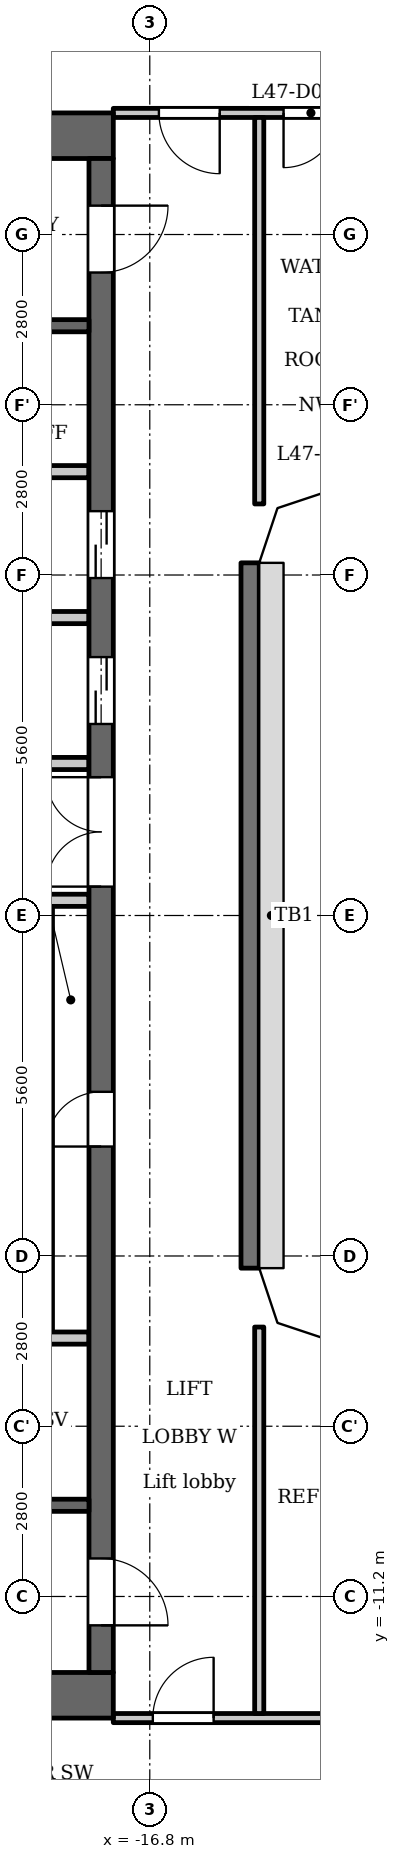
"""IFC4 building model, lengths in metres.
Left out: names, types, materials, properties, quantities, classifications, styles, units other than length and angle.
Written with IfcOpenShell. Run it as: python <this file> out.ifc"""

import sys

from ifc_helpers import new_model, si_unit, direction, frame, frame_2d, origin, place, context, subcontext, project, spatial, polyline, rectangle, outline, extrude, element, fill, save


model = new_model("IFC4")
c1 = context("Model", 3, precision=1e-05, world=origin(), true_north=direction((0.0, 1.0)))
c2 = subcontext(c1, "Body", "Model", "MODEL_VIEW")
j1 = project(units=[si_unit("LENGTHUNIT", "METRE"), si_unit("PLANEANGLEUNIT", "RADIAN")], contexts=[c1])
p1 = place(None, origin())
s1 = spatial("IfcSite", under=j1, at=p1, CompositionType="ELEMENT")
p2 = place(p1, origin())
s2 = spatial("IfcBuilding", under=s1, at=p2, CompositionType="ELEMENT")
p3 = place(p2, frame((0.0, 0.0, 183.5)))
s3 = spatial("IfcBuildingStorey", under=s2, at=p3, CompositionType="ELEMENT", Elevation=183.5)
p4 = place(p3, frame((-15.15, -5.8, 0.0), z_axis=(0.0, 0.0, 1.0), x_axis=(0.0, 1.0, 0.0)))
e1 = element("IfcWall", 1, at=p4, inside=s3, PredefinedType="SOLIDWALL", context=c2, shape_type="SweptSolid", body=[
    extrude(rectangle(XDim=11.6, YDim=0.3, at=frame_2d((5.8, 0.0))), origin(), (0.0, 0.0, 1.0), 4.6),
])
for number, where, z_axis, x_axis in (
    (2, (-17.4, 12.825, 0.0), (0.0, 0.0, 1.0), (-1.0, 0.0, 0.0)),
    (3, (-17.4, -12.825, 0.0), (0.0, 0.0, 1.0), (-1.0, 0.0, 0.0)),
):
    element("IfcWall", number, at=place(p3, frame(where, z_axis=z_axis, x_axis=x_axis)), inside=s3, PredefinedType="SHEAR", context=c2, shape_type="SweptSolid", body=[
        extrude(rectangle(XDim=10.4, YDim=0.75, at=frame_2d((5.2, 0.0))), origin(), (0.0, 0.0, 1.0), 4.6),
    ])
p5 = place(p3, frame((-17.6, -12.45, 0.0), z_axis=(0.0, 0.0, 1.0), x_axis=(0.0, 1.0, 0.0)))
e4 = element("IfcWall", 4, at=p5, inside=s3, PredefinedType="SHEAR", context=c2, shape_type="SweptSolid", body=[
    extrude(rectangle(XDim=24.9, YDim=0.4, at=frame_2d((12.45, 0.0))), origin(), (0.0, 0.0, 1.0), 4.6),
])
p6 = place(p5, frame((8.65, 0.0, 0.0)))
e5 = element("IfcOpeningElement", 5, at=p6, cuts=e4, PredefinedType="OPENING", context=c2, shape_type="SweptSolid", body=[
    extrude(rectangle(XDim=0.9, YDim=2.1, at=frame_2d((0.45, 1.05))), frame((0.0, 0.21, 0.0), z_axis=(0.0, -1.0, 0.0), x_axis=(1.0, 0.0, 0.0)), (0.0, 0.0, 1.0), 0.42),
])
p7 = place(p5, frame((15.6, 0.0, 0.0)))
e6 = element("IfcOpeningElement", 6, at=p7, cuts=e4, PredefinedType="OPENING", context=c2, shape_type="SweptSolid", body=[
    extrude(rectangle(XDim=1.1, YDim=2.1, at=frame_2d((0.55, 1.05))), frame((0.0, 0.21, 0.0), z_axis=(0.0, -1.0, 0.0), x_axis=(1.0, 0.0, 0.0)), (0.0, 0.0, 1.0), 0.42),
])
p8 = place(p5, frame((18.0, 0.0, 0.0)))
e7 = element("IfcOpeningElement", 7, at=p8, cuts=e4, PredefinedType="OPENING", context=c2, shape_type="SweptSolid", body=[
    extrude(rectangle(XDim=1.1, YDim=2.1, at=frame_2d((0.55, 1.05))), frame((0.0, 0.21, 0.0), z_axis=(0.0, -1.0, 0.0), x_axis=(1.0, 0.0, 0.0)), (0.0, 0.0, 1.0), 0.42),
])
p9 = place(p5, frame((23.025, 0.0, 0.0)))
e8 = element("IfcOpeningElement", 8, at=p9, cuts=e4, PredefinedType="OPENING", context=c2, shape_type="SweptSolid", body=[
    extrude(rectangle(XDim=1.1, YDim=2.1, at=frame_2d((0.55, 1.05))), frame((0.0, 0.21, 0.0), z_axis=(0.0, -1.0, 0.0), x_axis=(1.0, 0.0, 0.0)), (0.0, 0.0, 1.0), 0.42),
])
p10 = place(p5, frame((0.775, 0.0, 0.0)))
e9 = element("IfcOpeningElement", 9, at=p10, cuts=e4, PredefinedType="OPENING", context=c2, shape_type="SweptSolid", body=[
    extrude(rectangle(XDim=1.1, YDim=2.1, at=frame_2d((0.55, 1.05))), frame((0.0, 0.21, 0.0), z_axis=(0.0, -1.0, 0.0), x_axis=(1.0, 0.0, 0.0)), (0.0, 0.0, 1.0), 0.42),
])
p11 = place(p5, frame((12.925, 0.0, 0.0)))
e10 = element("IfcOpeningElement", 10, at=p11, cuts=e4, PredefinedType="OPENING", context=c2, shape_type="SweptSolid", body=[
    extrude(rectangle(XDim=1.8, YDim=2.1, at=frame_2d((0.9, 1.05))), frame((0.0, 0.21, 0.0), z_axis=(0.0, -1.0, 0.0), x_axis=(1.0, 0.0, 0.0)), (0.0, 0.0, 1.0), 0.42),
])
p12 = place(p3, frame((-17.8, -9.7, 0.0), z_axis=(0.0, 0.0, 1.0), x_axis=(-1.0, 0.0, 0.0)))
e11 = element("IfcWall", 11, at=p12, inside=s3, PredefinedType="SHEAR", context=c2, shape_type="SweptSolid", body=[
    extrude(rectangle(XDim=8.45, YDim=0.2, at=frame_2d((4.225, 0.0))), origin(), (0.0, 0.0, 1.0), 4.6),
])
p13 = place(p12, frame((0.85, 0.0, 0.0)))
e12 = element("IfcOpeningElement", 12, at=p13, cuts=e11, PredefinedType="OPENING", context=c2, shape_type="SweptSolid", body=[
    extrude(rectangle(XDim=1.1, YDim=2.1, at=frame_2d((0.55, 1.05))), frame((0.0, 0.11, 0.0), z_axis=(0.0, -1.0, 0.0), x_axis=(1.0, 0.0, 0.0)), (0.0, 0.0, 1.0), 0.22),
])
p14 = place(p12, frame((3.75, 0.0, 0.0)))
e13 = element("IfcOpeningElement", 13, at=p14, cuts=e11, PredefinedType="OPENING", context=c2, shape_type="SweptSolid", body=[
    extrude(rectangle(XDim=1.1, YDim=2.1, at=frame_2d((0.55, 1.05))), frame((0.0, 0.11, 0.0), z_axis=(0.0, -1.0, 0.0), x_axis=(1.0, 0.0, 0.0)), (0.0, 0.0, 1.0), 0.22),
])
p15 = place(p3, frame((-17.8, -6.95, 0.0), z_axis=(0.0, 0.0, 1.0), x_axis=(-1.0, 0.0, 0.0)))
e14 = element("IfcWall", 14, at=p15, inside=s3, PredefinedType="PARTITIONING", context=c2, shape_type="SweptSolid", body=[
    extrude(rectangle(XDim=2.8, YDim=0.2, at=frame_2d((1.4, 0.0))), origin(), (0.0, 0.0, 1.0), 4.6),
])
p16 = place(p3, frame((-17.8, 0.25, 0.0), z_axis=(0.0, 0.0, 1.0), x_axis=(-1.0, 0.0, 0.0)))
e15 = element("IfcWall", 15, at=p16, inside=s3, PredefinedType="PARTITIONING", context=c2, shape_type="SweptSolid", body=[
    extrude(rectangle(XDim=3.0, YDim=0.2, at=frame_2d((1.5, 0.0))), origin(), (0.0, 0.0, 1.0), 4.6),
])
p17 = place(p16, frame((1.35, 0.0, 0.0)))
e16 = element("IfcOpeningElement", 16, at=p17, cuts=e15, PredefinedType="OPENING", context=c2, shape_type="SweptSolid", body=[
    extrude(rectangle(XDim=0.9, YDim=2.1, at=frame_2d((0.45, 1.05))), frame((0.0, 0.11, 0.0), z_axis=(0.0, -1.0, 0.0), x_axis=(1.0, 0.0, 0.0)), (0.0, 0.0, 1.0), 0.22),
])
p18 = place(p3, frame((-17.8, 2.5, 0.0), z_axis=(0.0, 0.0, 1.0), x_axis=(-1.0, 0.0, 0.0)))
e17 = element("IfcWall", 17, at=p18, inside=s3, PredefinedType="PARTITIONING", context=c2, shape_type="SweptSolid", body=[
    extrude(rectangle(XDim=3.0, YDim=0.2, at=frame_2d((1.5, 0.0))), origin(), (0.0, 0.0, 1.0), 4.6),
])
for number, where, z_axis, x_axis in (
    (18, (-17.8, 4.9, 0.0), (0.0, 0.0, 1.0), (-1.0, 0.0, 0.0)),
    (19, (-17.8, 7.3, 0.0), (0.0, 0.0, 1.0), (-1.0, 0.0, 0.0)),
):
    element("IfcWall", number, at=place(p3, frame(where, z_axis=z_axis, x_axis=x_axis)), inside=s3, PredefinedType="PARTITIONING", context=c2, shape_type="SweptSolid", body=[
        extrude(rectangle(XDim=2.8, YDim=0.2, at=frame_2d((1.4, 0.0))), origin(), (0.0, 0.0, 1.0), 4.6),
    ])
p19 = place(p3, frame((-17.8, 9.7, 0.0), z_axis=(0.0, 0.0, 1.0), x_axis=(-1.0, 0.0, 0.0)))
e20 = element("IfcWall", 20, at=p19, inside=s3, PredefinedType="SHEAR", context=c2, shape_type="SweptSolid", body=[
    extrude(rectangle(XDim=8.45, YDim=0.2, at=frame_2d((4.225, 0.0))), origin(), (0.0, 0.0, 1.0), 4.6),
])
p20 = place(p19, frame((0.85, 0.0, 0.0)))
e21 = element("IfcOpeningElement", 21, at=p20, cuts=e20, PredefinedType="OPENING", context=c2, shape_type="SweptSolid", body=[
    extrude(rectangle(XDim=1.1, YDim=2.1, at=frame_2d((0.55, 1.05))), frame((0.0, 0.11, 0.0), z_axis=(0.0, -1.0, 0.0), x_axis=(1.0, 0.0, 0.0)), (0.0, 0.0, 1.0), 0.22),
])
p21 = place(p19, frame((3.75, 0.0, 0.0)))
e22 = element("IfcOpeningElement", 22, at=p21, cuts=e20, PredefinedType="OPENING", context=c2, shape_type="SweptSolid", body=[
    extrude(rectangle(XDim=1.1, YDim=2.1, at=frame_2d((0.55, 1.05))), frame((0.0, 0.11, 0.0), z_axis=(0.0, -1.0, 0.0), x_axis=(1.0, 0.0, 0.0)), (0.0, 0.0, 1.0), 0.22),
])
p22 = place(p3, frame((-17.4, -13.2, 0.0), z_axis=(0.0, 0.0, 1.0), x_axis=(1.0, 0.0, 0.0)))
e23 = element("IfcWall", 23, at=p22, inside=s3, PredefinedType="PARTITIONING", context=c2, shape_type="SweptSolid", body=[
    extrude(rectangle(XDim=5.88, YDim=0.15, at=frame_2d((2.94, 0.0))), origin(), (0.0, 0.0, 1.0), 4.6),
])
p23 = place(p22, frame((0.65, 0.0, 0.0)))
e24 = element("IfcOpeningElement", 24, at=p23, cuts=e23, PredefinedType="OPENING", context=c2, shape_type="SweptSolid", body=[
    extrude(rectangle(XDim=1.0, YDim=2.1, at=frame_2d((0.5, 1.05))), frame((0.0, 0.085, 0.0), z_axis=(0.0, -1.0, 0.0), x_axis=(1.0, 0.0, 0.0)), (0.0, 0.0, 1.0), 0.17),
])
p24 = place(p22, frame((4.26, 0.0, 0.0)))
e25 = element("IfcOpeningElement", 25, at=p24, cuts=e23, PredefinedType="OPENING", context=c2, shape_type="SweptSolid", body=[
    extrude(rectangle(XDim=1.2, YDim=2.1, at=frame_2d((0.6, 1.05))), frame((0.0, 0.085, 0.0), z_axis=(0.0, -1.0, 0.0), x_axis=(1.0, 0.0, 0.0)), (0.0, 0.0, 1.0), 0.17),
])
p25 = place(p3, frame((-17.4, 13.2, 0.0), z_axis=(0.0, 0.0, 1.0), x_axis=(1.0, 0.0, 0.0)))
e26 = element("IfcWall", 26, at=p25, inside=s3, PredefinedType="PARTITIONING", context=c2, shape_type="SweptSolid", body=[
    extrude(rectangle(XDim=5.88, YDim=0.15, at=frame_2d((2.94, 0.0))), origin(), (0.0, 0.0, 1.0), 4.6),
])
p26 = place(p25, frame((0.75, 0.0, 0.0)))
e27 = element("IfcOpeningElement", 27, at=p26, cuts=e26, PredefinedType="OPENING", context=c2, shape_type="SweptSolid", body=[
    extrude(rectangle(XDim=1.0, YDim=2.1, at=frame_2d((0.5, 1.05))), frame((0.0, 0.085, 0.0), z_axis=(0.0, -1.0, 0.0), x_axis=(1.0, 0.0, 0.0)), (0.0, 0.0, 1.0), 0.17),
])
p27 = place(p25, frame((4.7, 0.0, 0.0)))
e28 = element("IfcOpeningElement", 28, at=p27, cuts=e26, PredefinedType="OPENING", context=c2, shape_type="SweptSolid", body=[
    extrude(rectangle(XDim=0.9, YDim=2.1, at=frame_2d((0.45, 1.05))), frame((0.0, 0.085, 0.0), z_axis=(0.0, -1.0, 0.0), x_axis=(1.0, 0.0, 0.0)), (0.0, 0.0, 1.0), 0.17),
])
p28 = place(p25, frame((2.8, 0.0, 0.0)))
e29 = element("IfcOpeningElement", 29, at=p28, cuts=e26, PredefinedType="OPENING", context=c2, shape_type="SweptSolid", body=[
    extrude(rectangle(XDim=0.9, YDim=2.1, at=frame_2d((0.45, 1.05))), frame((0.0, 0.085, 0.0), z_axis=(0.0, -1.0, 0.0), x_axis=(1.0, 0.0, 0.0)), (0.0, 0.0, 1.0), 0.17),
])
for number, where, z_axis, x_axis in (
    (30, (-15.0, -13.125, 0.0), (0.0, 0.0, 1.0), (0.0, 1.0, 0.0)),
    (31, (-15.0, 6.769, 0.0), (0.0, 0.0, 1.0), (0.0, 1.0, 0.0)),
):
    element("IfcWall", number, at=place(p3, frame(where, z_axis=z_axis, x_axis=x_axis)), inside=s3, PredefinedType="PARTITIONING", context=c2, shape_type="SweptSolid", body=[
        extrude(rectangle(XDim=6.356, YDim=0.15, at=frame_2d((3.178, 0.0))), origin(), (0.0, 0.0, 1.0), 4.6),
    ])
p29 = place(p3, origin())
e32 = element("IfcWall", 32, at=p29, inside=s3, PredefinedType="SOLIDWALL", context=c2, shape_type="SweptSolid", body=[
    extrude(outline(polyline([(-15.0, 5.8), (-14.7, 6.7), (-13.8, 7.0), (-13.8, 7.3), (-13.849, 7.3), (-14.937, 6.937), (-15.3, 5.849), (-15.3, 5.8), (-15.0, 5.8)])), origin(), (0.0, 0.0, 1.0), 4.6),
])
e33 = element("IfcWall", 33, at=p29, inside=s3, PredefinedType="SOLIDWALL", context=c2, shape_type="SweptSolid", body=[
    extrude(outline(polyline([(-13.8, -7.0), (-14.7, -6.7), (-15.0, -5.8), (-15.3, -5.8), (-15.3, -5.849), (-14.937, -6.937), (-13.849, -7.3), (-13.8, -7.3), (-13.8, -7.0)])), origin(), (0.0, 0.0, 1.0), 4.6),
])
p30 = place(p6, origin())
e34 = element("IfcDoor", 34, at=p30, inside=s3, OperationType="SINGLE_SWING_RIGHT", PredefinedType="DOOR", context=c2, shape_type="SweptSolid", body=[
    extrude(rectangle(XDim=0.9, YDim=2.1, at=frame_2d((0.45, 1.05))), frame((0.0, 0.025, 0.0), z_axis=(0.0, -1.0, 0.0), x_axis=(1.0, 0.0, 0.0)), (0.0, 0.0, 1.0), 0.05),
])
fill(e5, e34)
p31 = place(p7, origin())
e35 = element("IfcDoor", 35, at=p31, inside=s3, OperationType="DOUBLE_DOOR_SLIDING", PredefinedType="DOOR", context=c2, shape_type="SweptSolid", body=[
    extrude(rectangle(XDim=1.1, YDim=2.1, at=frame_2d((0.55, 1.05))), frame((0.0, 0.025, 0.0), z_axis=(0.0, -1.0, 0.0), x_axis=(1.0, 0.0, 0.0)), (0.0, 0.0, 1.0), 0.05),
])
fill(e6, e35)
p32 = place(p8, origin())
e36 = element("IfcDoor", 36, at=p32, inside=s3, OperationType="DOUBLE_DOOR_SLIDING", PredefinedType="DOOR", context=c2, shape_type="SweptSolid", body=[
    extrude(rectangle(XDim=1.1, YDim=2.1, at=frame_2d((0.55, 1.05))), frame((0.0, 0.025, 0.0), z_axis=(0.0, -1.0, 0.0), x_axis=(1.0, 0.0, 0.0)), (0.0, 0.0, 1.0), 0.05),
])
fill(e7, e36)
p33 = place(p9, origin())
e37 = element("IfcDoor", 37, at=p33, inside=s3, OperationType="SINGLE_SWING_RIGHT", PredefinedType="DOOR", context=c2, shape_type="SweptSolid", body=[
    extrude(rectangle(XDim=1.1, YDim=2.1, at=frame_2d((0.55, 1.05))), frame((0.0, 0.025, 0.0), z_axis=(0.0, -1.0, 0.0), x_axis=(1.0, 0.0, 0.0)), (0.0, 0.0, 1.0), 0.05),
])
fill(e8, e37)
p34 = place(p10, origin())
e38 = element("IfcDoor", 38, at=p34, inside=s3, OperationType="SINGLE_SWING_LEFT", PredefinedType="DOOR", context=c2, shape_type="SweptSolid", body=[
    extrude(rectangle(XDim=1.1, YDim=2.1, at=frame_2d((0.55, 1.05))), frame((0.0, 0.025, 0.0), z_axis=(0.0, -1.0, 0.0), x_axis=(1.0, 0.0, 0.0)), (0.0, 0.0, 1.0), 0.05),
])
fill(e9, e38)
p35 = place(p11, origin())
e39 = element("IfcDoor", 39, at=p35, inside=s3, OperationType="DOUBLE_DOOR_SINGLE_SWING", PredefinedType="DOOR", context=c2, shape_type="SweptSolid", body=[
    extrude(rectangle(XDim=1.8, YDim=2.1, at=frame_2d((0.9, 1.05))), frame((0.0, 0.025, 0.0), z_axis=(0.0, -1.0, 0.0), x_axis=(1.0, 0.0, 0.0)), (0.0, 0.0, 1.0), 0.05),
])
fill(e10, e39)
p36 = place(p26, origin())
e40 = element("IfcDoor", 40, at=p36, inside=s3, OperationType="SINGLE_SWING_RIGHT", PredefinedType="DOOR", context=c2, shape_type="SweptSolid", body=[
    extrude(rectangle(XDim=1.0, YDim=2.1, at=frame_2d((0.5, 1.05))), frame((0.0, 0.025, 0.0), z_axis=(0.0, -1.0, 0.0), x_axis=(1.0, 0.0, 0.0)), (0.0, 0.0, 1.0), 0.05),
])
fill(e27, e40)
p37 = place(p28, origin())
e41 = element("IfcDoor", 41, at=p37, inside=s3, OperationType="SINGLE_SWING_LEFT", PredefinedType="DOOR", context=c2, shape_type="SweptSolid", body=[
    extrude(rectangle(XDim=0.9, YDim=2.1, at=frame_2d((0.45, 1.05))), frame((0.0, 0.025, 0.0), z_axis=(0.0, -1.0, 0.0), x_axis=(1.0, 0.0, 0.0)), (0.0, 0.0, 1.0), 0.05),
])
fill(e29, e41)
p38 = place(p23, origin())
e42 = element("IfcDoor", 42, at=p38, inside=s3, OperationType="SINGLE_SWING_LEFT", PredefinedType="DOOR", context=c2, shape_type="SweptSolid", body=[
    extrude(rectangle(XDim=1.0, YDim=2.1, at=frame_2d((0.5, 1.05))), frame((0.0, 0.025, 0.0), z_axis=(0.0, -1.0, 0.0), x_axis=(1.0, 0.0, 0.0)), (0.0, 0.0, 1.0), 0.05),
])
fill(e24, e42)
save(model, sys.argv[1])
